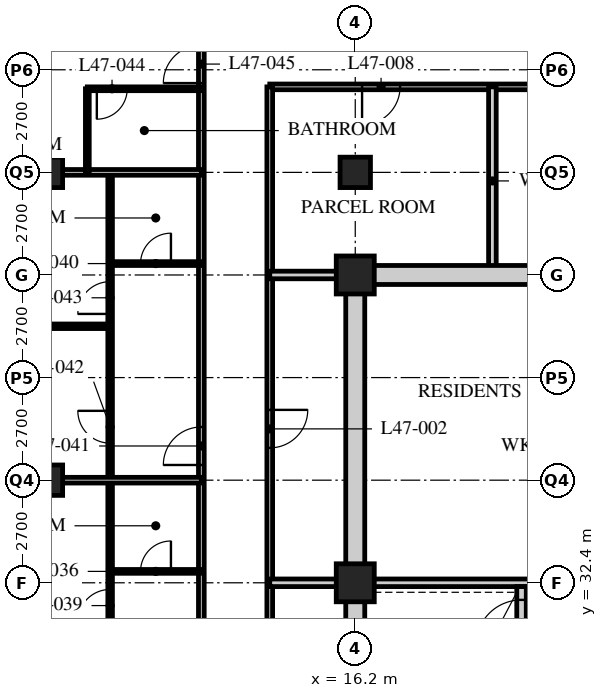
"""IFC4 building model, lengths in metres.
Left out: names, types, materials, properties, quantities, classifications, styles, units other than length and angle.
Written with IfcOpenShell. Run it as: python <this file> out.ifc"""

import sys

from ifc_helpers import new_model, si_unit, direction, frame, frame_2d, origin, origin_2d, place, context, subcontext, project, spatial, rectangle, hollow_rectangle, extrude, element, fill, save


model = new_model("IFC4")
c1 = context("Model", 3, precision=1e-05, world=origin(), true_north=direction((0.0, 1.0)))
c2 = subcontext(c1, "Body", "Model", "MODEL_VIEW")
j1 = project(units=[si_unit("LENGTHUNIT", "METRE"), si_unit("PLANEANGLEUNIT", "RADIAN")], contexts=[c1])
p1 = place(None, origin())
s1 = spatial("IfcSite", under=j1, at=p1, CompositionType="ELEMENT")
p2 = place(p1, origin())
s2 = spatial("IfcBuilding", under=s1, at=p2, CompositionType="ELEMENT")
p3 = place(p2, frame((0.0, 0.0, 184.8)))
s3 = spatial("IfcBuildingStorey", under=s2, at=p3, CompositionType="ELEMENT", Elevation=184.8)
for number, where, z_axis, x_axis in (
    (1, (8.1, 35.1, 0.0), (0.0, 0.0, 1.0), (1.0, 0.0, 0.0)),
    (2, (8.1, 43.2, 0.0), (0.0, 0.0, 1.0), (1.0, 0.0, 0.0)),
):
    element("IfcColumn", number, at=place(p3, frame(where, z_axis=z_axis, x_axis=x_axis)), inside=s3, PredefinedType="COLUMN", context=c2, shape_type="SweptSolid", body=[
        extrude(hollow_rectangle(XDim=0.8, YDim=0.8, WallThickness=0.08, at=origin_2d()), origin(), (0.0, 0.0, 1.0), 3.6),
    ])
for number, where, z_axis, x_axis in (
    (3, (16.2, 32.4, 0.0), (0.0, 0.0, 1.0), (1.0, 0.0, 0.0)),
    (4, (16.2, 40.5, 0.0), (0.0, 0.0, 1.0), (1.0, 0.0, 0.0)),
):
    element("IfcColumn", number, at=place(p3, frame(where, z_axis=z_axis, x_axis=x_axis)), inside=s3, PredefinedType="COLUMN", context=c2, shape_type="SweptSolid", body=[
        extrude(hollow_rectangle(XDim=1.0, YDim=1.0, WallThickness=0.1, at=origin_2d()), origin(), (0.0, 0.0, 1.0), 3.6),
    ])
p4 = place(p3, frame((16.2, 43.2, 0.0), z_axis=(0.0, 0.0, 1.0), x_axis=(1.0, 0.0, 0.0)))
e5 = element("IfcColumn", 5, at=p4, inside=s3, PredefinedType="COLUMN", context=c2, shape_type="SweptSolid", body=[
    extrude(hollow_rectangle(XDim=0.8, YDim=0.8, WallThickness=0.08, at=origin_2d()), origin(), (0.0, 0.0, 1.0), 3.6),
])
p5 = place(p3, frame((12.15, 18.9, 0.0), z_axis=(0.0, 0.0, 1.0), x_axis=(0.0, 1.0, 0.0)))
e6 = element("IfcWall", 6, at=p5, inside=s3, PredefinedType="PARTITIONING", context=c2, shape_type="SweptSolid", body=[
    extrude(rectangle(XDim=28.35, YDim=0.15, at=frame_2d((14.175, 0.0))), origin(), (0.0, 0.0, 1.0), 3.39),
])
p6 = place(p5, frame((2.35, 0.0, 0.0)))
e7 = element("IfcOpeningElement", 7, at=p6, cuts=e6, PredefinedType="OPENING", context=c2, shape_type="SweptSolid", body=[
    extrude(rectangle(XDim=1.0, YDim=2.1, at=frame_2d((0.5, 1.05))), frame((0.0, 0.085, 0.0), z_axis=(0.0, -1.0, 0.0), x_axis=(1.0, 0.0, 0.0)), (0.0, 0.0, 1.0), 0.17),
])
p7 = place(p5, frame((6.4, 0.0, 0.0)))
e8 = element("IfcOpeningElement", 8, at=p7, cuts=e6, PredefinedType="OPENING", context=c2, shape_type="SweptSolid", body=[
    extrude(rectangle(XDim=1.0, YDim=2.1, at=frame_2d((0.5, 1.05))), frame((0.0, 0.085, 0.0), z_axis=(0.0, -1.0, 0.0), x_axis=(1.0, 0.0, 0.0)), (0.0, 0.0, 1.0), 0.17),
])
p8 = place(p5, frame((8.5, 0.0, 0.0)))
e9 = element("IfcOpeningElement", 9, at=p8, cuts=e6, PredefinedType="OPENING", context=c2, shape_type="SweptSolid", body=[
    extrude(rectangle(XDim=1.0, YDim=2.1, at=frame_2d((0.5, 1.05))), frame((0.0, 0.085, 0.0), z_axis=(0.0, -1.0, 0.0), x_axis=(1.0, 0.0, 0.0)), (0.0, 0.0, 1.0), 0.17),
])
p9 = place(p5, frame((16.6, 0.0, 0.0)))
e10 = element("IfcOpeningElement", 10, at=p9, cuts=e6, PredefinedType="OPENING", context=c2, shape_type="SweptSolid", body=[
    extrude(rectangle(XDim=1.0, YDim=2.1, at=frame_2d((0.5, 1.05))), frame((0.0, 0.085, 0.0), z_axis=(0.0, -1.0, 0.0), x_axis=(1.0, 0.0, 0.0)), (0.0, 0.0, 1.0), 0.17),
])
p10 = place(p5, frame((26.65, 0.0, 0.0)))
e11 = element("IfcOpeningElement", 11, at=p10, cuts=e6, PredefinedType="OPENING", context=c2, shape_type="SweptSolid", body=[
    extrude(rectangle(XDim=1.0, YDim=2.1, at=frame_2d((0.5, 1.05))), frame((0.0, 0.085, 0.0), z_axis=(0.0, -1.0, 0.0), x_axis=(1.0, 0.0, 0.0)), (0.0, 0.0, 1.0), 0.17),
])
p11 = place(p3, frame((27.14, 45.45, 0.0), z_axis=(0.0, 0.0, 1.0), x_axis=(-1.0, 0.0, 0.0)))
e12 = element("IfcWall", 12, at=p11, inside=s3, PredefinedType="PARTITIONING", context=c2, shape_type="SweptSolid", body=[
    extrude(rectangle(XDim=13.19, YDim=0.15, at=frame_2d((6.595, 0.0))), origin(), (0.0, 0.0, 1.0), 3.39),
])
p12 = place(p11, frame((9.761, 0.0, 0.0)))
e13 = element("IfcOpeningElement", 13, at=p12, cuts=e12, PredefinedType="OPENING", context=c2, shape_type="SweptSolid", body=[
    extrude(rectangle(XDim=1.0, YDim=2.1, at=frame_2d((0.5, 1.05))), frame((0.0, 0.085, 0.0), z_axis=(0.0, -1.0, 0.0), x_axis=(1.0, 0.0, 0.0)), (0.0, 0.0, 1.0), 0.17),
])
p13 = place(p11, frame((3.161, 0.0, 0.0)))
e14 = element("IfcOpeningElement", 14, at=p13, cuts=e12, PredefinedType="OPENING", context=c2, shape_type="SweptSolid", body=[
    extrude(rectangle(XDim=1.0, YDim=2.1, at=frame_2d((0.5, 1.05))), frame((0.0, 0.085, 0.0), z_axis=(0.0, -1.0, 0.0), x_axis=(1.0, 0.0, 0.0)), (0.0, 0.0, 1.0), 0.17),
])
p14 = place(p3, frame((13.95, 45.45, 0.0), z_axis=(0.0, 0.0, 1.0), x_axis=(0.0, -1.0, 0.0)))
e15 = element("IfcWall", 15, at=p14, inside=s3, PredefinedType="PARTITIONING", context=c2, shape_type="SweptSolid", body=[
    extrude(rectangle(XDim=24.75, YDim=0.15, at=frame_2d((12.375, 0.0))), origin(), (0.0, 0.0, 1.0), 3.39),
])
p15 = place(p14, frame((16.6, 0.0, 0.0)))
e16 = element("IfcOpeningElement", 16, at=p15, cuts=e15, PredefinedType="OPENING", context=c2, shape_type="SweptSolid", body=[
    extrude(rectangle(XDim=1.0, YDim=2.1, at=frame_2d((0.5, 1.05))), frame((0.0, 0.085, 0.0), z_axis=(0.0, -1.0, 0.0), x_axis=(1.0, 0.0, 0.0)), (0.0, 0.0, 1.0), 0.17),
])
p16 = place(p14, frame((8.5, 0.0, 0.0)))
e17 = element("IfcOpeningElement", 17, at=p16, cuts=e15, PredefinedType="OPENING", context=c2, shape_type="SweptSolid", body=[
    extrude(rectangle(XDim=1.0, YDim=2.1, at=frame_2d((0.5, 1.05))), frame((0.0, 0.085, 0.0), z_axis=(0.0, -1.0, 0.0), x_axis=(1.0, 0.0, 0.0)), (0.0, 0.0, 1.0), 0.17),
])
p17 = place(p3, frame((13.95, 32.4, 0.0), z_axis=(0.0, 0.0, 1.0), x_axis=(1.0, 0.0, 0.0)))
e18 = element("IfcWall", 18, at=p17, inside=s3, PredefinedType="SOLIDWALL", context=c2, shape_type="SweptSolid", body=[
    extrude(rectangle(XDim=2.25, YDim=0.2, at=frame_2d((1.125, 0.0))), origin(), (0.0, 0.0, 1.0), 3.39),
])
p18 = place(p3, frame((19.809, 45.45, 0.0), z_axis=(0.0, 0.0, 1.0), x_axis=(0.0, -1.0, 0.0)))
e19 = element("IfcWall", 19, at=p18, inside=s3, PredefinedType="SOLIDWALL", context=c2, shape_type="SweptSolid", body=[
    extrude(rectangle(XDim=4.95, YDim=0.2, at=frame_2d((2.475, 0.0))), origin(), (0.0, 0.0, 1.0), 3.39),
])
p19 = place(p3, frame((13.95, 40.5, 0.0), z_axis=(0.0, 0.0, 1.0), x_axis=(1.0, 0.0, 0.0)))
e20 = element("IfcWall", 20, at=p19, inside=s3, PredefinedType="SOLIDWALL", context=c2, shape_type="SweptSolid", body=[
    extrude(rectangle(XDim=2.25, YDim=0.2, at=frame_2d((1.125, 0.0))), origin(), (0.0, 0.0, 1.0), 3.39),
])
p20 = place(p3, frame((9.75, 27.0, 0.0), z_axis=(0.0, 0.0, 1.0), x_axis=(0.0, 1.0, 0.0)))
e21 = element("IfcWall", 21, at=p20, inside=s3, PredefinedType="PARTITIONING", context=c2, shape_type="SweptSolid", body=[
    extrude(rectangle(XDim=16.2, YDim=0.12, at=frame_2d((8.1, 0.0))), origin(), (0.0, 0.0, 1.0), 3.39),
])
p21 = place(p20, frame((0.975, 0.0, 0.0)))
e22 = element("IfcOpeningElement", 22, at=p21, cuts=e21, PredefinedType="OPENING", context=c2, shape_type="SweptSolid", body=[
    extrude(rectangle(XDim=0.85, YDim=2.1, at=frame_2d((0.425, 1.05))), frame((0.0, 0.07, 0.0), z_axis=(0.0, -1.0, 0.0), x_axis=(1.0, 0.0, 0.0)), (0.0, 0.0, 1.0), 0.14),
])
p22 = place(p20, frame((4.375, 0.0, 0.0)))
e23 = element("IfcOpeningElement", 23, at=p22, cuts=e21, PredefinedType="OPENING", context=c2, shape_type="SweptSolid", body=[
    extrude(rectangle(XDim=0.85, YDim=2.1, at=frame_2d((0.425, 1.05))), frame((0.0, 0.07, 0.0), z_axis=(0.0, -1.0, 0.0), x_axis=(1.0, 0.0, 0.0)), (0.0, 0.0, 1.0), 0.14),
])
p23 = place(p20, frame((9.075, 0.0, 0.0)))
e24 = element("IfcOpeningElement", 24, at=p23, cuts=e21, PredefinedType="OPENING", context=c2, shape_type="SweptSolid", body=[
    extrude(rectangle(XDim=0.85, YDim=2.1, at=frame_2d((0.425, 1.05))), frame((0.0, 0.07, 0.0), z_axis=(0.0, -1.0, 0.0), x_axis=(1.0, 0.0, 0.0)), (0.0, 0.0, 1.0), 0.14),
])
p24 = place(p20, frame((12.475, 0.0, 0.0)))
e25 = element("IfcOpeningElement", 25, at=p24, cuts=e21, PredefinedType="OPENING", context=c2, shape_type="SweptSolid", body=[
    extrude(rectangle(XDim=0.85, YDim=2.1, at=frame_2d((0.425, 1.05))), frame((0.0, 0.07, 0.0), z_axis=(0.0, -1.0, 0.0), x_axis=(1.0, 0.0, 0.0)), (0.0, 0.0, 1.0), 0.14),
])
p25 = place(p3, frame((12.15, 32.7, 0.0), z_axis=(0.0, 0.0, 1.0), x_axis=(-1.0, 0.0, 0.0)))
e26 = element("IfcWall", 26, at=p25, inside=s3, PredefinedType="PARTITIONING", context=c2, shape_type="SweptSolid", body=[
    extrude(rectangle(XDim=2.4, YDim=0.1, at=frame_2d((1.2, 0.0))), origin(), (0.0, 0.0, 1.0), 3.39),
])
p26 = place(p25, frame((0.8, 0.0, 0.0)))
e27 = element("IfcOpeningElement", 27, at=p26, cuts=e26, PredefinedType="OPENING", context=c2, shape_type="SweptSolid", body=[
    extrude(rectangle(XDim=0.8, YDim=2.1, at=frame_2d((0.4, 1.05))), frame((0.0, 0.06, 0.0), z_axis=(0.0, -1.0, 0.0), x_axis=(1.0, 0.0, 0.0)), (0.0, 0.0, 1.0), 0.12),
])
p27 = place(p3, frame((12.15, 35.1, 0.0), z_axis=(0.0, 0.0, 1.0), x_axis=(-1.0, 0.0, 0.0)))
e28 = element("IfcWall", 28, at=p27, inside=s3, PredefinedType="PARTITIONING", context=c2, shape_type="SweptSolid", body=[
    extrude(rectangle(XDim=11.85, YDim=0.15, at=frame_2d((5.925, 0.0))), origin(), (0.0, 0.0, 1.0), 2.778),
])
p28 = place(p3, frame((12.15, 40.8, 0.0), z_axis=(0.0, 0.0, 1.0), x_axis=(-1.0, 0.0, 0.0)))
e29 = element("IfcWall", 29, at=p28, inside=s3, PredefinedType="PARTITIONING", context=c2, shape_type="SweptSolid", body=[
    extrude(rectangle(XDim=2.4, YDim=0.1, at=frame_2d((1.2, 0.0))), origin(), (0.0, 0.0, 1.0), 3.39),
])
p29 = place(p28, frame((0.8, 0.0, 0.0)))
e30 = element("IfcOpeningElement", 30, at=p29, cuts=e29, PredefinedType="OPENING", context=c2, shape_type="SweptSolid", body=[
    extrude(rectangle(XDim=0.8, YDim=2.1, at=frame_2d((0.4, 1.05))), frame((0.0, 0.06, 0.0), z_axis=(0.0, -1.0, 0.0), x_axis=(1.0, 0.0, 0.0)), (0.0, 0.0, 1.0), 0.12),
])
p30 = place(p3, frame((9.75, 39.15, 0.0), z_axis=(0.0, 0.0, 1.0), x_axis=(-1.0, 0.0, 0.0)))
e31 = element("IfcWall", 31, at=p30, inside=s3, PredefinedType="PARTITIONING", context=c2, shape_type="SweptSolid", body=[
    extrude(rectangle(XDim=9.45, YDim=0.12, at=frame_2d((4.725, 0.0))), origin(), (0.0, 0.0, 1.0), 3.39),
])
p31 = place(p3, frame((12.15, 43.2, 0.0), z_axis=(0.0, 0.0, 1.0), x_axis=(-1.0, 0.0, 0.0)))
e32 = element("IfcWall", 32, at=p31, inside=s3, PredefinedType="PARTITIONING", context=c2, shape_type="SweptSolid", body=[
    extrude(rectangle(XDim=11.85, YDim=0.15, at=frame_2d((5.925, 0.0))), origin(), (0.0, 0.0, 1.0), 2.778),
])
p32 = place(p3, frame((9.15, 43.2, 0.0), z_axis=(0.0, 0.0, 1.0), x_axis=(0.0, 1.0, 0.0)))
e33 = element("IfcWall", 33, at=p32, inside=s3, PredefinedType="PARTITIONING", context=c2, shape_type="SweptSolid", body=[
    extrude(rectangle(XDim=2.2, YDim=0.1, at=frame_2d((1.1, 0.0))), origin(), (0.0, 0.0, 1.0), 3.39),
])
p33 = place(p3, frame((12.15, 45.4, 0.0), z_axis=(0.0, 0.0, 1.0), x_axis=(-1.0, 0.0, 0.0)))
e34 = element("IfcWall", 34, at=p33, inside=s3, PredefinedType="PARTITIONING", context=c2, shape_type="SweptSolid", body=[
    extrude(rectangle(XDim=3.0, YDim=0.1, at=frame_2d((1.5, 0.0))), origin(), (0.0, 0.0, 1.0), 3.39),
])
p34 = place(p33, frame((1.95, 0.0, 0.0)))
e35 = element("IfcOpeningElement", 35, at=p34, cuts=e34, PredefinedType="OPENING", context=c2, shape_type="SweptSolid", body=[
    extrude(rectangle(XDim=0.8, YDim=2.1, at=frame_2d((0.4, 1.05))), frame((0.0, 0.06, 0.0), z_axis=(0.0, -1.0, 0.0), x_axis=(1.0, 0.0, 0.0)), (0.0, 0.0, 1.0), 0.12),
])
p35 = place(p3, frame((15.95, 40.5, 0.0), z_axis=(0.0, 0.0, 1.0), x_axis=(1.0, 0.0, 0.0)))
e36 = element("IfcWall", 36, at=p35, inside=s3, PredefinedType="SOLIDWALL", context=c2, shape_type="SweptSolid", body=[
    extrude(rectangle(XDim=24.8, YDim=0.5, at=frame_2d((12.4, 0.0))), origin(), (0.0, 0.0, 1.0), 2.74),
])
p36 = place(p35, frame((11.5, 0.0, 0.0)))
e37 = element("IfcOpeningElement", 37, at=p36, cuts=e36, PredefinedType="OPENING", context=c2, shape_type="SweptSolid", body=[
    extrude(rectangle(XDim=1.8, YDim=2.4, at=frame_2d((0.9, 1.2))), frame((0.0, 0.26, 0.0), z_axis=(0.0, -1.0, 0.0), x_axis=(1.0, 0.0, 0.0)), (0.0, 0.0, 1.0), 0.52),
])
p37 = place(p3, frame((16.2, 24.55, 0.0), z_axis=(0.0, 0.0, 1.0), x_axis=(0.0, 1.0, 0.0)))
e38 = element("IfcWall", 38, at=p37, inside=s3, PredefinedType="SOLIDWALL", context=c2, shape_type="SweptSolid", body=[
    extrude(rectangle(XDim=15.7, YDim=0.5, at=frame_2d((7.85, 0.0))), origin(), (0.0, 0.0, 1.0), 2.778),
])
p38 = place(p3, frame((16.45, 32.4, 0.0), z_axis=(0.0, 0.0, 1.0), x_axis=(1.0, 0.0, 0.0)))
e39 = element("IfcWall", 39, at=p38, inside=s3, PredefinedType="SOLIDWALL", context=c2, shape_type="SweptSolid", body=[
    extrude(rectangle(XDim=7.95, YDim=0.2, at=frame_2d((3.975, 0.0))), origin(), (0.0, 0.0, 1.0), 2.778),
])
p39 = place(p3, frame((20.575, 24.55, 0.0), z_axis=(0.0, 0.0, 1.0), x_axis=(0.0, 1.0, 0.0)))
e40 = element("IfcWall", 40, at=p39, inside=s3, PredefinedType="SOLIDWALL", context=c2, shape_type="SweptSolid", body=[
    extrude(rectangle(XDim=7.75, YDim=0.25, at=frame_2d((3.875, 0.0))), origin(), (0.0, 0.0, 1.0), 3.39),
])
p40 = place(p39, frame((6.2, 0.0, 0.0)))
e41 = element("IfcOpeningElement", 41, at=p40, cuts=e40, PredefinedType="OPENING", context=c2, shape_type="SweptSolid", body=[
    extrude(rectangle(XDim=1.2, YDim=2.1, at=frame_2d((0.6, 1.05))), frame((0.0, 0.135, 0.0), z_axis=(0.0, -1.0, 0.0), x_axis=(1.0, 0.0, 0.0)), (0.0, 0.0, 1.0), 0.27),
])
p41 = place(p16, origin())
e42 = element("IfcDoor", 42, at=p41, inside=s3, OperationType="SINGLE_SWING_LEFT", PredefinedType="DOOR", context=c2, shape_type="SweptSolid", body=[
    extrude(rectangle(XDim=1.0, YDim=2.1, at=frame_2d((0.5, 1.05))), frame((0.0, 0.025, 0.0), z_axis=(0.0, -1.0, 0.0), x_axis=(1.0, 0.0, 0.0)), (0.0, 0.0, 1.0), 0.05),
])
fill(e17, e42)
p42 = place(p12, origin())
e43 = element("IfcDoor", 43, at=p42, inside=s3, OperationType="SINGLE_SWING_RIGHT", PredefinedType="DOOR", context=c2, shape_type="SweptSolid", body=[
    extrude(rectangle(XDim=1.0, YDim=2.1, at=frame_2d((0.5, 1.05))), frame((0.0, 0.025, 0.0), z_axis=(0.0, -1.0, 0.0), x_axis=(1.0, 0.0, 0.0)), (0.0, 0.0, 1.0), 0.05),
])
fill(e13, e43)
p43 = place(p26, origin())
e44 = element("IfcDoor", 44, at=p43, inside=s3, OperationType="SINGLE_SWING_RIGHT", PredefinedType="DOOR", context=c2, shape_type="SweptSolid", body=[
    extrude(rectangle(XDim=0.8, YDim=2.1, at=frame_2d((0.4, 1.05))), frame((0.0, 0.025, 0.0), z_axis=(0.0, -1.0, 0.0), x_axis=(1.0, 0.0, 0.0)), (0.0, 0.0, 1.0), 0.05),
])
fill(e27, e44)
p44 = place(p22, origin())
e45 = element("IfcDoor", 45, at=p44, inside=s3, OperationType="SINGLE_SWING_LEFT", PredefinedType="DOOR", context=c2, shape_type="SweptSolid", body=[
    extrude(rectangle(XDim=0.85, YDim=2.1, at=frame_2d((0.425, 1.05))), frame((0.0, 0.025, 0.0), z_axis=(0.0, -1.0, 0.0), x_axis=(1.0, 0.0, 0.0)), (0.0, 0.0, 1.0), 0.05),
])
fill(e23, e45)
p45 = place(p29, origin())
e46 = element("IfcDoor", 46, at=p45, inside=s3, OperationType="SINGLE_SWING_RIGHT", PredefinedType="DOOR", context=c2, shape_type="SweptSolid", body=[
    extrude(rectangle(XDim=0.8, YDim=2.1, at=frame_2d((0.4, 1.05))), frame((0.0, 0.025, 0.0), z_axis=(0.0, -1.0, 0.0), x_axis=(1.0, 0.0, 0.0)), (0.0, 0.0, 1.0), 0.05),
])
fill(e30, e46)
p46 = place(p9, origin())
e47 = element("IfcDoor", 47, at=p46, inside=s3, OperationType="SINGLE_SWING_LEFT", PredefinedType="DOOR", context=c2, shape_type="SweptSolid", body=[
    extrude(rectangle(XDim=1.0, YDim=2.1, at=frame_2d((0.5, 1.05))), frame((0.0, 0.025, 0.0), z_axis=(0.0, -1.0, 0.0), x_axis=(1.0, 0.0, 0.0)), (0.0, 0.0, 1.0), 0.05),
])
fill(e10, e47)
p47 = place(p23, origin())
e48 = element("IfcDoor", 48, at=p47, inside=s3, OperationType="SINGLE_SWING_RIGHT", PredefinedType="DOOR", context=c2, shape_type="SweptSolid", body=[
    extrude(rectangle(XDim=0.85, YDim=2.1, at=frame_2d((0.425, 1.05))), frame((0.0, 0.025, 0.0), z_axis=(0.0, -1.0, 0.0), x_axis=(1.0, 0.0, 0.0)), (0.0, 0.0, 1.0), 0.05),
])
fill(e24, e48)
p48 = place(p24, origin())
e49 = element("IfcDoor", 49, at=p48, inside=s3, OperationType="SINGLE_SWING_LEFT", PredefinedType="DOOR", context=c2, shape_type="SweptSolid", body=[
    extrude(rectangle(XDim=0.85, YDim=2.1, at=frame_2d((0.425, 1.05))), frame((0.0, 0.025, 0.0), z_axis=(0.0, -1.0, 0.0), x_axis=(1.0, 0.0, 0.0)), (0.0, 0.0, 1.0), 0.05),
])
fill(e25, e49)
p49 = place(p34, origin())
e50 = element("IfcDoor", 50, at=p49, inside=s3, OperationType="SINGLE_SWING_RIGHT", PredefinedType="DOOR", context=c2, shape_type="SweptSolid", body=[
    extrude(rectangle(XDim=0.8, YDim=2.1, at=frame_2d((0.4, 1.05))), frame((0.0, 0.025, 0.0), z_axis=(0.0, -1.0, 0.0), x_axis=(1.0, 0.0, 0.0)), (0.0, 0.0, 1.0), 0.05),
])
fill(e35, e50)
p50 = place(p10, origin())
e51 = element("IfcDoor", 51, at=p50, inside=s3, OperationType="SINGLE_SWING_LEFT", PredefinedType="DOOR", context=c2, shape_type="SweptSolid", body=[
    extrude(rectangle(XDim=1.0, YDim=2.1, at=frame_2d((0.5, 1.05))), frame((0.0, 0.025, 0.0), z_axis=(0.0, -1.0, 0.0), x_axis=(1.0, 0.0, 0.0)), (0.0, 0.0, 1.0), 0.05),
])
fill(e11, e51)
p51 = place(p40, origin())
e52 = element("IfcDoor", 52, at=p51, inside=s3, OperationType="SINGLE_SWING_LEFT", PredefinedType="DOOR", context=c2, shape_type="SweptSolid", body=[
    extrude(rectangle(XDim=1.2, YDim=2.1, at=frame_2d((0.6, 1.05))), frame((0.0, 0.025, 0.0), z_axis=(0.0, -1.0, 0.0), x_axis=(1.0, 0.0, 0.0)), (0.0, 0.0, 1.0), 0.05),
])
fill(e41, e52)
save(model, sys.argv[1])
